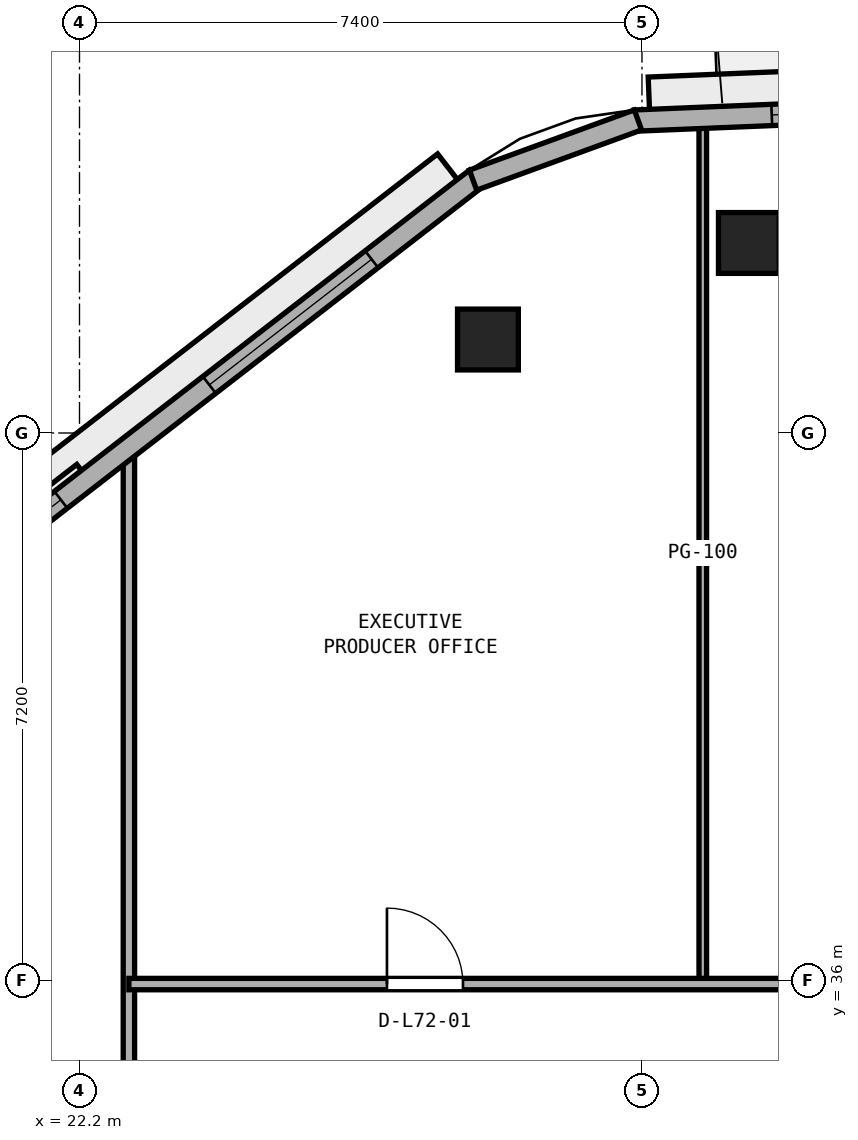
"""IFC4 building model, lengths in metres.
Left out: names, types, materials, properties, quantities, classifications, styles, units other than length and angle.
Written with IfcOpenShell. Run it as: python <this file> out.ifc"""

import sys

from ifc_helpers import new_model, si_unit, direction, frame, frame_2d, origin, origin_2d, place, context, subcontext, project, spatial, rectangle, extrude, element, fill, save


model = new_model("IFC4")
c1 = context("Model", 3, precision=1e-05, world=origin(), true_north=direction((0.0, 1.0)))
c2 = subcontext(c1, "Body", "Model", "MODEL_VIEW")
j1 = project(units=[si_unit("LENGTHUNIT", "METRE"), si_unit("PLANEANGLEUNIT", "RADIAN")], contexts=[c1])
p1 = place(None, origin())
s1 = spatial("IfcSite", under=j1, at=p1, CompositionType="ELEMENT")
p2 = place(p1, origin())
s2 = spatial("IfcBuilding", under=s1, at=p2, CompositionType="ELEMENT")
p3 = place(p2, frame((0.0, 0.0, 282.0)))
s3 = spatial("IfcBuildingStorey", under=s2, at=p3, CompositionType="ELEMENT", Elevation=282.0)
for number, where, z_axis, x_axis in (
    (1, (31.007, 45.7, 0.0), (0.0, 0.0, 1.0), (1.0, 0.0, 0.0)),
    (2, (27.573, 44.43, 0.0), (0.0, 0.0, 1.0), (1.0, 0.0, 0.0)),
):
    element("IfcColumn", number, at=place(p3, frame(where, z_axis=z_axis, x_axis=x_axis)), inside=s3, PredefinedType="COLUMN", context=c2, shape_type="SweptSolid", body=[
        extrude(rectangle(XDim=0.8, YDim=0.8, at=origin_2d()), origin(), (0.0, 0.0, 1.0), 3.8),
    ])
p4 = place(p3, frame((30.4, 35.95, 0.0), z_axis=(0.0, 0.0, 1.0), x_axis=(0.0, 1.0, 0.0)))
e3 = element("IfcWall", 3, at=p4, inside=s3, PredefinedType="PARTITIONING", context=c2, shape_type="SweptSolid", body=[
    extrude(rectangle(XDim=11.332, YDim=0.1, at=frame_2d((5.666, 0.0))), origin(), (0.0, 0.0, 1.0), 3.54),
])
p5 = place(p3, frame((22.85, 7.037, 0.0), z_axis=(0.0, 0.0, 1.0), x_axis=(0.0, 1.0, 0.0)))
e4 = element("IfcWall", 4, at=p5, inside=s3, PredefinedType="PARTITIONING", context=c2, shape_type="SweptSolid", body=[
    extrude(rectangle(XDim=36.013, YDim=0.15, at=frame_2d((18.007, 0.0))), origin(), (0.0, 0.0, 1.0), 3.54),
])
p6 = place(p5, frame((10.088, 0.0, 0.0)))
e5 = element("IfcOpeningElement", 5, at=p6, cuts=e4, PredefinedType="OPENING", context=c2, shape_type="SweptSolid", body=[
    extrude(rectangle(XDim=0.9, YDim=2.1, at=frame_2d((0.45, 1.05))), frame((0.0, 0.085, 0.0), z_axis=(0.0, -1.0, 0.0), x_axis=(1.0, 0.0, 0.0)), (0.0, 0.0, 1.0), 0.17),
])
p7 = place(p5, frame((16.963, 0.0, 0.0)))
e6 = element("IfcOpeningElement", 6, at=p7, cuts=e4, PredefinedType="OPENING", context=c2, shape_type="SweptSolid", body=[
    extrude(rectangle(XDim=0.9, YDim=2.1, at=frame_2d((0.45, 1.05))), frame((0.0, 0.085, 0.0), z_axis=(0.0, -1.0, 0.0), x_axis=(1.0, 0.0, 0.0)), (0.0, 0.0, 1.0), 0.17),
])
p8 = place(p5, frame((24.588, 0.0, 0.0)))
e7 = element("IfcOpeningElement", 7, at=p8, cuts=e4, PredefinedType="OPENING", context=c2, shape_type="SweptSolid", body=[
    extrude(rectangle(XDim=0.9, YDim=2.1, at=frame_2d((0.45, 1.05))), frame((0.0, 0.085, 0.0), z_axis=(0.0, -1.0, 0.0), x_axis=(1.0, 0.0, 0.0)), (0.0, 0.0, 1.0), 0.17),
])
p9 = place(p3, frame((22.85, 35.95, 0.0), z_axis=(0.0, 0.0, 1.0), x_axis=(1.0, 0.0, 0.0)))
e8 = element("IfcWall", 8, at=p9, inside=s3, PredefinedType="PARTITIONING", context=c2, shape_type="SweptSolid", body=[
    extrude(rectangle(XDim=25.75, YDim=0.15, at=frame_2d((12.875, 0.0))), origin(), (0.0, 0.0, 1.0), 3.54),
])
p10 = place(p9, frame((3.395, 0.0, 0.0)))
e9 = element("IfcOpeningElement", 9, at=p10, cuts=e8, PredefinedType="OPENING", context=c2, shape_type="SweptSolid", body=[
    extrude(rectangle(XDim=1.0, YDim=2.12, at=frame_2d((0.5, 1.06))), frame((0.0, 0.085, 0.0), z_axis=(0.0, -1.0, 0.0), x_axis=(1.0, 0.0, 0.0)), (0.0, 0.0, 1.0), 0.17),
])
p11 = place(p9, frame((16.03, 0.0, 0.0)))
e10 = element("IfcOpeningElement", 10, at=p11, cuts=e8, PredefinedType="OPENING", context=c2, shape_type="SweptSolid", body=[
    extrude(rectangle(XDim=1.0, YDim=2.12, at=frame_2d((0.5, 1.06))), frame((0.0, 0.085, 0.0), z_axis=(0.0, -1.0, 0.0), x_axis=(1.0, 0.0, 0.0)), (0.0, 0.0, 1.0), 0.17),
])
p12 = place(p3, frame((46.414, 48.005, 0.0), z_axis=(0.0, 0.0, 1.0), x_axis=(-0.999156194126, -0.041071885021, 0.0)))
e11 = element("IfcWall", 11, at=p12, inside=s3, PredefinedType="STANDARD", context=c2, shape_type="SweptSolid", body=[
    extrude(rectangle(XDim=16.923, YDim=0.28, at=frame_2d((8.461, 0.0))), origin(), (0.0, 0.0, 1.0), 3.54),
])
p13 = place(p12, frame((7.912, 0.0, 0.0)))
e12 = element("IfcOpeningElement", 12, at=p13, cuts=e11, PredefinedType="OPENING", context=c2, shape_type="SweptSolid", body=[
    extrude(rectangle(XDim=1.1, YDim=2.2, at=frame_2d((0.55, 1.1))), frame((0.0, 0.15, 0.0), z_axis=(0.0, -1.0, 0.0), x_axis=(1.0, 0.0, 0.0)), (0.0, 0.0, 1.0), 0.3),
])
p14 = place(p12, frame((1.804, 0.0, 0.9)))
e13 = element("IfcOpeningElement", 13, at=p14, cuts=e11, PredefinedType="OPENING", context=c2, shape_type="SweptSolid", body=[
    extrude(rectangle(XDim=2.7, YDim=1.75, at=frame_2d((1.35, 0.875))), frame((0.0, 0.15, 0.0), z_axis=(0.0, -1.0, 0.0), x_axis=(1.0, 0.0, 0.0)), (0.0, 0.0, 1.0), 0.3),
])
p15 = place(p12, frame((12.419, 0.0, 0.9)))
e14 = element("IfcOpeningElement", 14, at=p15, cuts=e11, PredefinedType="OPENING", context=c2, shape_type="SweptSolid", body=[
    extrude(rectangle(XDim=2.7, YDim=1.75, at=frame_2d((1.35, 0.875))), frame((0.0, 0.15, 0.0), z_axis=(0.0, -1.0, 0.0), x_axis=(1.0, 0.0, 0.0)), (0.0, 0.0, 1.0), 0.3),
])
p16 = place(p3, frame((27.415, 46.547, 0.0), z_axis=(0.0, 0.0, 1.0), x_axis=(-0.790789745248, -0.612087884875, 0.0)))
e15 = element("IfcWall", 15, at=p16, inside=s3, PredefinedType="STANDARD", context=c2, shape_type="SweptSolid", body=[
    extrude(rectangle(XDim=16.509, YDim=0.28, at=frame_2d((8.254, 0.0))), origin(), (0.0, 0.0, 1.0), 3.54),
])
p17 = place(p16, frame((1.735, 0.0, 0.9)))
e16 = element("IfcOpeningElement", 16, at=p17, cuts=e15, PredefinedType="OPENING", context=c2, shape_type="SweptSolid", body=[
    extrude(rectangle(XDim=2.7, YDim=1.75, at=frame_2d((1.35, 0.875))), frame((0.0, 0.15, 0.0), z_axis=(0.0, -1.0, 0.0), x_axis=(1.0, 0.0, 0.0)), (0.0, 0.0, 1.0), 0.3),
])
p18 = place(p16, frame((6.905, 0.0, 0.9)))
e17 = element("IfcOpeningElement", 17, at=p18, cuts=e15, PredefinedType="OPENING", context=c2, shape_type="SweptSolid", body=[
    extrude(rectangle(XDim=2.7, YDim=1.75, at=frame_2d((1.35, 0.875))), frame((0.0, 0.15, 0.0), z_axis=(0.0, -1.0, 0.0), x_axis=(1.0, 0.0, 0.0)), (0.0, 0.0, 1.0), 0.3),
])
p19 = place(p16, frame((12.074, 0.0, 0.9)))
e18 = element("IfcOpeningElement", 18, at=p19, cuts=e15, PredefinedType="OPENING", context=c2, shape_type="SweptSolid", body=[
    extrude(rectangle(XDim=2.7, YDim=1.75, at=frame_2d((1.35, 0.875))), frame((0.0, 0.15, 0.0), z_axis=(0.0, -1.0, 0.0), x_axis=(1.0, 0.0, 0.0)), (0.0, 0.0, 1.0), 0.3),
])
p20 = place(p3, frame((29.547, 47.318, 0.0), z_axis=(0.0, 0.0, 1.0), x_axis=(-0.93940703724, -0.342803760748, 0.0)))
e19 = element("IfcWall", 19, at=p20, inside=s3, PredefinedType="STANDARD", context=c2, shape_type="SweptSolid", body=[
    extrude(rectangle(XDim=2.31, YDim=0.28, at=frame_2d((1.155, 0.0))), origin(), (0.0, 0.0, 1.0), 3.54),
])
p21 = place(p10, origin())
e20 = element("IfcDoor", 20, at=p21, inside=s3, OperationType="SINGLE_SWING_LEFT", PredefinedType="DOOR", context=c2, shape_type="SweptSolid", body=[
    extrude(rectangle(XDim=1.0, YDim=2.12, at=frame_2d((0.5, 1.06))), frame((0.0, 0.025, 0.0), z_axis=(0.0, -1.0, 0.0), x_axis=(1.0, 0.0, 0.0)), (0.0, 0.0, 1.0), 0.05),
])
fill(e9, e20)
p22 = place(p15, origin())
e21 = element("IfcWindow", 21, at=p22, inside=s3, PartitioningType="SINGLE_PANEL", PredefinedType="WINDOW", context=c2, shape_type="SweptSolid", body=[
    extrude(rectangle(XDim=2.7, YDim=1.75, at=frame_2d((1.35, 0.875))), frame((0.0, 0.03, 0.0), z_axis=(0.0, -1.0, 0.0), x_axis=(1.0, 0.0, 0.0)), (0.0, 0.0, 1.0), 0.06),
])
fill(e14, e21)
p23 = place(p17, origin())
e22 = element("IfcWindow", 22, at=p23, inside=s3, PartitioningType="SINGLE_PANEL", PredefinedType="WINDOW", context=c2, shape_type="SweptSolid", body=[
    extrude(rectangle(XDim=2.7, YDim=1.75, at=frame_2d((1.35, 0.875))), frame((0.0, 0.03, 0.0), z_axis=(0.0, -1.0, 0.0), x_axis=(1.0, 0.0, 0.0)), (0.0, 0.0, 1.0), 0.06),
])
fill(e16, e22)
p24 = place(p18, origin())
e23 = element("IfcWindow", 23, at=p24, inside=s3, PartitioningType="SINGLE_PANEL", PredefinedType="WINDOW", context=c2, shape_type="SweptSolid", body=[
    extrude(rectangle(XDim=2.7, YDim=1.75, at=frame_2d((1.35, 0.875))), frame((0.0, 0.03, 0.0), z_axis=(0.0, -1.0, 0.0), x_axis=(1.0, 0.0, 0.0)), (0.0, 0.0, 1.0), 0.06),
])
fill(e17, e23)
save(model, sys.argv[1])
